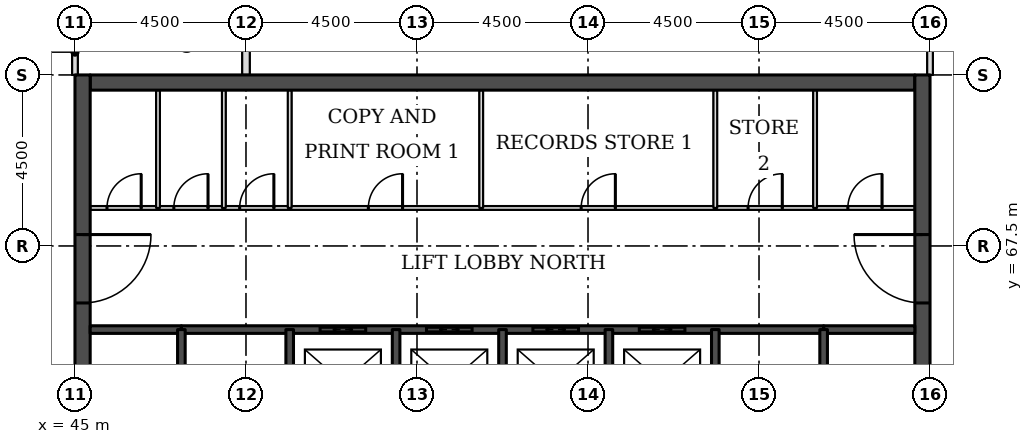
"""IFC4 building model, lengths in metres.
Left out: names, types, materials, properties, quantities, classifications, styles, units other than length and angle.
Written with IfcOpenShell. Run it as: python <this file> out.ifc"""

import sys

from ifc_helpers import new_model, si_unit, direction, frame, frame_2d, origin, place, context, subcontext, project, spatial, rectangle, extrude, element, fill, save


model = new_model("IFC4")
c1 = context("Model", 3, precision=1e-05, world=origin(), true_north=direction((0.0, 1.0)))
c2 = subcontext(c1, "Body", "Model", "MODEL_VIEW")
j1 = project(units=[si_unit("LENGTHUNIT", "METRE"), si_unit("PLANEANGLEUNIT", "RADIAN")], contexts=[c1])
p1 = place(None, origin())
s1 = spatial("IfcSite", under=j1, at=p1, CompositionType="ELEMENT")
p2 = place(p1, origin())
s2 = spatial("IfcBuilding", under=s1, at=p2, CompositionType="ELEMENT")
p3 = place(p2, frame((0.0, 0.0, 177.3)))
s3 = spatial("IfcBuildingStorey", under=s2, at=p3, CompositionType="ELEMENT", Elevation=177.3)
p4 = place(p3, frame((45.4, 71.8, 0.0), z_axis=(0.0, 0.0, 1.0), x_axis=(1.0, 0.0, 0.0)))
e1 = element("IfcWall", 1, at=p4, inside=s3, PredefinedType="SHEAR", context=c2, shape_type="SweptSolid", body=[
    extrude(rectangle(XDim=21.7, YDim=0.4, at=frame_2d((10.85, 0.0))), origin(), (0.0, 0.0, 1.0), 3.7),
])
p5 = place(p3, frame((45.2, 49.5, 0.0), z_axis=(0.0, 0.0, 1.0), x_axis=(0.0, 1.0, 0.0)))
e2 = element("IfcWall", 2, at=p5, inside=s3, PredefinedType="SHEAR", context=c2, shape_type="SweptSolid", body=[
    extrude(rectangle(XDim=22.5, YDim=0.4, at=frame_2d((11.25, 0.0))), origin(), (0.0, 0.0, 1.0), 3.7),
])
p6 = place(p5, frame((4.2, 0.0, 0.0)))
e3 = element("IfcOpeningElement", 3, at=p6, cuts=e2, PredefinedType="OPENING", context=c2, shape_type="SweptSolid", body=[
    extrude(rectangle(XDim=1.8, YDim=2.1, at=frame_2d((0.9, 1.05))), frame((0.0, 0.21, 0.0), z_axis=(0.0, -1.0, 0.0), x_axis=(1.0, 0.0, 0.0)), (0.0, 0.0, 1.0), 0.42),
])
p7 = place(p5, frame((6.9, 0.0, 0.0)))
e4 = element("IfcOpeningElement", 4, at=p7, cuts=e2, PredefinedType="OPENING", context=c2, shape_type="SweptSolid", body=[
    extrude(rectangle(XDim=1.1, YDim=2.1, at=frame_2d((0.55, 1.05))), frame((0.0, 0.21, 0.0), z_axis=(0.0, -1.0, 0.0), x_axis=(1.0, 0.0, 0.0)), (0.0, 0.0, 1.0), 0.42),
])
p8 = place(p5, frame((13.6, 0.0, 0.0)))
e5 = element("IfcOpeningElement", 5, at=p8, cuts=e2, PredefinedType="OPENING", context=c2, shape_type="SweptSolid", body=[
    extrude(rectangle(XDim=1.1, YDim=2.1, at=frame_2d((0.55, 1.05))), frame((0.0, 0.21, 0.0), z_axis=(0.0, -1.0, 0.0), x_axis=(1.0, 0.0, 0.0)), (0.0, 0.0, 1.0), 0.42),
])
p9 = place(p5, frame((16.5, 0.0, 0.0)))
e6 = element("IfcOpeningElement", 6, at=p9, cuts=e2, PredefinedType="OPENING", context=c2, shape_type="SweptSolid", body=[
    extrude(rectangle(XDim=1.8, YDim=2.1, at=frame_2d((0.9, 1.05))), frame((0.0, 0.21, 0.0), z_axis=(0.0, -1.0, 0.0), x_axis=(1.0, 0.0, 0.0)), (0.0, 0.0, 1.0), 0.42),
])
p10 = place(p3, frame((67.3, 49.5, 0.0), z_axis=(0.0, 0.0, 1.0), x_axis=(0.0, 1.0, 0.0)))
e7 = element("IfcWall", 7, at=p10, inside=s3, PredefinedType="SHEAR", context=c2, shape_type="SweptSolid", body=[
    extrude(rectangle(XDim=22.5, YDim=0.4, at=frame_2d((11.25, 0.0))), origin(), (0.0, 0.0, 1.0), 3.7),
])
p11 = place(p10, frame((4.2, 0.0, 0.0)))
e8 = element("IfcOpeningElement", 8, at=p11, cuts=e7, PredefinedType="OPENING", context=c2, shape_type="SweptSolid", body=[
    extrude(rectangle(XDim=1.8, YDim=2.1, at=frame_2d((0.9, 1.05))), frame((0.0, 0.21, 0.0), z_axis=(0.0, -1.0, 0.0), x_axis=(1.0, 0.0, 0.0)), (0.0, 0.0, 1.0), 0.42),
])
p12 = place(p10, frame((6.9, 0.0, 0.0)))
e9 = element("IfcOpeningElement", 9, at=p12, cuts=e7, PredefinedType="OPENING", context=c2, shape_type="SweptSolid", body=[
    extrude(rectangle(XDim=1.1, YDim=2.1, at=frame_2d((0.55, 1.05))), frame((0.0, 0.21, 0.0), z_axis=(0.0, -1.0, 0.0), x_axis=(1.0, 0.0, 0.0)), (0.0, 0.0, 1.0), 0.42),
])
p13 = place(p10, frame((13.6, 0.0, 0.0)))
e10 = element("IfcOpeningElement", 10, at=p13, cuts=e7, PredefinedType="OPENING", context=c2, shape_type="SweptSolid", body=[
    extrude(rectangle(XDim=1.1, YDim=2.1, at=frame_2d((0.55, 1.05))), frame((0.0, 0.21, 0.0), z_axis=(0.0, -1.0, 0.0), x_axis=(1.0, 0.0, 0.0)), (0.0, 0.0, 1.0), 0.42),
])
p14 = place(p10, frame((16.5, 0.0, 0.0)))
e11 = element("IfcOpeningElement", 11, at=p14, cuts=e7, PredefinedType="OPENING", context=c2, shape_type="SweptSolid", body=[
    extrude(rectangle(XDim=1.8, YDim=2.1, at=frame_2d((0.9, 1.05))), frame((0.0, 0.21, 0.0), z_axis=(0.0, -1.0, 0.0), x_axis=(1.0, 0.0, 0.0)), (0.0, 0.0, 1.0), 0.42),
])
p15 = place(p3, frame((45.0, 72.0, 0.0), z_axis=(0.0, 0.0, 1.0), x_axis=(0.0, 1.0, 0.0)))
e12 = element("IfcWall", 12, at=p15, inside=s3, PredefinedType="PARTITIONING", context=c2, shape_type="SweptSolid", body=[
    extrude(rectangle(XDim=6.0, YDim=0.15, at=frame_2d((3.0, 0.0))), origin(), (0.0, 0.0, 1.0), 3.022),
])
p16 = place(p15, frame((2.5, 0.0, 0.0)))
e13 = element("IfcOpeningElement", 13, at=p16, cuts=e12, PredefinedType="OPENING", context=c2, shape_type="SweptSolid", body=[
    extrude(rectangle(XDim=1.0, YDim=2.1, at=frame_2d((0.5, 1.05))), frame((0.0, 0.085, 0.0), z_axis=(0.0, -1.0, 0.0), x_axis=(1.0, 0.0, 0.0)), (0.0, 0.0, 1.0), 0.17),
])
p17 = place(p3, frame((49.5, 72.0, 0.0), z_axis=(0.0, 0.0, 1.0), x_axis=(0.0, 1.0, 0.0)))
e14 = element("IfcWall", 14, at=p17, inside=s3, PredefinedType="PARTITIONING", context=c2, shape_type="SweptSolid", body=[
    extrude(rectangle(XDim=3.0, YDim=0.2, at=frame_2d((1.5, 0.0))), origin(), (0.0, 0.0, 1.0), 3.55),
])
p18 = place(p3, frame((67.5, 72.0, 0.0), z_axis=(0.0, 0.0, 1.0), x_axis=(0.0, 1.0, 0.0)))
e15 = element("IfcWall", 15, at=p18, inside=s3, PredefinedType="PARTITIONING", context=c2, shape_type="SweptSolid", body=[
    extrude(rectangle(XDim=3.0, YDim=0.15, at=frame_2d((1.5, 0.0))), origin(), (0.0, 0.0, 1.0), 3.022),
])
p19 = place(p18, frame((1.0, 0.0, 0.0)))
e16 = element("IfcOpeningElement", 16, at=p19, cuts=e15, PredefinedType="OPENING", context=c2, shape_type="SweptSolid", body=[
    extrude(rectangle(XDim=1.0, YDim=2.1, at=frame_2d((0.5, 1.05))), frame((0.0, 0.085, 0.0), z_axis=(0.0, -1.0, 0.0), x_axis=(1.0, 0.0, 0.0)), (0.0, 0.0, 1.0), 0.17),
])
for number, where, z_axis, x_axis in (
    (17, (45.4, 65.3, 0.0), (0.0, 0.0, 1.0), (1.0, 0.0, 0.0)),
    (18, (64.7, 65.3, 0.0), (0.0, 0.0, 1.0), (1.0, 0.0, 0.0)),
):
    element("IfcWall", number, at=place(p3, frame(where, z_axis=z_axis, x_axis=x_axis)), inside=s3, PredefinedType="SOLIDWALL", context=c2, shape_type="SweptSolid", body=[
        extrude(rectangle(XDim=2.4, YDim=0.2, at=frame_2d((1.2, 0.0))), origin(), (0.0, 0.0, 1.0), 3.55),
    ])
p20 = place(p3, frame((47.8, 65.3, 0.0), z_axis=(0.0, 0.0, 1.0), x_axis=(1.0, 0.0, 0.0)))
e19 = element("IfcWall", 19, at=p20, inside=s3, PredefinedType="SOLIDWALL", context=c2, shape_type="SweptSolid", body=[
    extrude(rectangle(XDim=16.9, YDim=0.2, at=frame_2d((8.45, 0.0))), origin(), (0.0, 0.0, 1.0), 3.55),
])
p21 = place(p20, frame((3.65, 0.0, 0.0)))
e20 = element("IfcOpeningElement", 20, at=p21, cuts=e19, PredefinedType="OPENING", context=c2, shape_type="SweptSolid", body=[
    extrude(rectangle(XDim=1.2, YDim=2.1, at=frame_2d((0.6, 1.05))), frame((0.0, 0.11, 0.0), z_axis=(0.0, -1.0, 0.0), x_axis=(1.0, 0.0, 0.0)), (0.0, 0.0, 1.0), 0.22),
])
p22 = place(p20, frame((6.45, 0.0, 0.0)))
e21 = element("IfcOpeningElement", 21, at=p22, cuts=e19, PredefinedType="OPENING", context=c2, shape_type="SweptSolid", body=[
    extrude(rectangle(XDim=1.2, YDim=2.1, at=frame_2d((0.6, 1.05))), frame((0.0, 0.11, 0.0), z_axis=(0.0, -1.0, 0.0), x_axis=(1.0, 0.0, 0.0)), (0.0, 0.0, 1.0), 0.22),
])
p23 = place(p20, frame((9.25, 0.0, 0.0)))
e22 = element("IfcOpeningElement", 22, at=p23, cuts=e19, PredefinedType="OPENING", context=c2, shape_type="SweptSolid", body=[
    extrude(rectangle(XDim=1.2, YDim=2.1, at=frame_2d((0.6, 1.05))), frame((0.0, 0.11, 0.0), z_axis=(0.0, -1.0, 0.0), x_axis=(1.0, 0.0, 0.0)), (0.0, 0.0, 1.0), 0.22),
])
p24 = place(p20, frame((12.05, 0.0, 0.0)))
e23 = element("IfcOpeningElement", 23, at=p24, cuts=e19, PredefinedType="OPENING", context=c2, shape_type="SweptSolid", body=[
    extrude(rectangle(XDim=1.2, YDim=2.1, at=frame_2d((0.6, 1.05))), frame((0.0, 0.11, 0.0), z_axis=(0.0, -1.0, 0.0), x_axis=(1.0, 0.0, 0.0)), (0.0, 0.0, 1.0), 0.22),
])
p25 = place(p3, frame((45.4, 68.5, 0.0), z_axis=(0.0, 0.0, 1.0), x_axis=(1.0, 0.0, 0.0)))
e24 = element("IfcWall", 24, at=p25, inside=s3, PredefinedType="PARTITIONING", context=c2, shape_type="SweptSolid", body=[
    extrude(rectangle(XDim=21.7, YDim=0.1, at=frame_2d((10.85, 0.0))), origin(), (0.0, 0.0, 1.0), 3.55),
])
p26 = place(p25, frame((19.938, 0.0, 0.0)))
e25 = element("IfcOpeningElement", 25, at=p26, cuts=e24, PredefinedType="OPENING", context=c2, shape_type="SweptSolid", body=[
    extrude(rectangle(XDim=0.9, YDim=2.1, at=frame_2d((0.45, 1.05))), frame((0.0, 0.06, 0.0), z_axis=(0.0, -1.0, 0.0), x_axis=(1.0, 0.0, 0.0)), (0.0, 0.0, 1.0), 0.12),
])
p27 = place(p25, frame((17.312, 0.0, 0.0)))
e26 = element("IfcOpeningElement", 26, at=p27, cuts=e24, PredefinedType="OPENING", context=c2, shape_type="SweptSolid", body=[
    extrude(rectangle(XDim=0.9, YDim=2.1, at=frame_2d((0.45, 1.05))), frame((0.0, 0.06, 0.0), z_axis=(0.0, -1.0, 0.0), x_axis=(1.0, 0.0, 0.0)), (0.0, 0.0, 1.0), 0.12),
])
p28 = place(p25, frame((0.442, 0.0, 0.0)))
e27 = element("IfcOpeningElement", 27, at=p28, cuts=e24, PredefinedType="OPENING", context=c2, shape_type="SweptSolid", body=[
    extrude(rectangle(XDim=0.9, YDim=2.1, at=frame_2d((0.45, 1.05))), frame((0.0, 0.06, 0.0), z_axis=(0.0, -1.0, 0.0), x_axis=(1.0, 0.0, 0.0)), (0.0, 0.0, 1.0), 0.12),
])
p29 = place(p25, frame((2.201, 0.0, 0.0)))
e28 = element("IfcOpeningElement", 28, at=p29, cuts=e24, PredefinedType="OPENING", context=c2, shape_type="SweptSolid", body=[
    extrude(rectangle(XDim=0.9, YDim=2.1, at=frame_2d((0.45, 1.05))), frame((0.0, 0.06, 0.0), z_axis=(0.0, -1.0, 0.0), x_axis=(1.0, 0.0, 0.0)), (0.0, 0.0, 1.0), 0.12),
])
p30 = place(p25, frame((3.934, 0.0, 0.0)))
e29 = element("IfcOpeningElement", 29, at=p30, cuts=e24, PredefinedType="OPENING", context=c2, shape_type="SweptSolid", body=[
    extrude(rectangle(XDim=0.9, YDim=2.1, at=frame_2d((0.45, 1.05))), frame((0.0, 0.06, 0.0), z_axis=(0.0, -1.0, 0.0), x_axis=(1.0, 0.0, 0.0)), (0.0, 0.0, 1.0), 0.12),
])
p31 = place(p25, frame((12.92, 0.0, 0.0)))
e30 = element("IfcOpeningElement", 30, at=p31, cuts=e24, PredefinedType="OPENING", context=c2, shape_type="SweptSolid", body=[
    extrude(rectangle(XDim=0.9, YDim=2.1, at=frame_2d((0.45, 1.05))), frame((0.0, 0.06, 0.0), z_axis=(0.0, -1.0, 0.0), x_axis=(1.0, 0.0, 0.0)), (0.0, 0.0, 1.0), 0.12),
])
p32 = place(p25, frame((7.32, 0.0, 0.0)))
e31 = element("IfcOpeningElement", 31, at=p32, cuts=e24, PredefinedType="OPENING", context=c2, shape_type="SweptSolid", body=[
    extrude(rectangle(XDim=0.9, YDim=2.1, at=frame_2d((0.45, 1.05))), frame((0.0, 0.06, 0.0), z_axis=(0.0, -1.0, 0.0), x_axis=(1.0, 0.0, 0.0)), (0.0, 0.0, 1.0), 0.12),
])
p33 = place(p3, frame((47.185, 68.5, 0.0), z_axis=(0.0, 0.0, 1.0), x_axis=(0.0, 1.0, 0.0)))
e32 = element("IfcWall", 32, at=p33, inside=s3, PredefinedType="PARTITIONING", context=c2, shape_type="SweptSolid", body=[
    extrude(rectangle(XDim=3.1, YDim=0.1, at=frame_2d((1.55, 0.0))), origin(), (0.0, 0.0, 1.0), 3.55),
])
p34 = place(p3, frame((47.8, 62.0, 0.0), z_axis=(0.0, 0.0, 1.0), x_axis=(0.0, 1.0, 0.0)))
e33 = element("IfcWall", 33, at=p34, inside=s3, PredefinedType="SOLIDWALL", context=c2, shape_type="SweptSolid", body=[
    extrude(rectangle(XDim=3.3, YDim=0.2, at=frame_2d((1.65, 0.0))), origin(), (0.0, 0.0, 1.0), 3.55),
])
p35 = place(p34, frame((1.1, 0.0, 0.0)))
e34 = element("IfcOpeningElement", 34, at=p35, cuts=e33, PredefinedType="OPENING", context=c2, shape_type="SweptSolid", body=[
    extrude(rectangle(XDim=1.1, YDim=2.1, at=frame_2d((0.55, 1.05))), frame((0.0, 0.11, 0.0), z_axis=(0.0, -1.0, 0.0), x_axis=(1.0, 0.0, 0.0)), (0.0, 0.0, 1.0), 0.22),
])
for number, where, z_axis, x_axis in (
    (35, (48.917, 68.5, 0.0), (0.0, 0.0, 1.0), (0.0, 1.0, 0.0)),
    (36, (50.65, 68.5, 0.0), (0.0, 0.0, 1.0), (0.0, 1.0, 0.0)),
):
    element("IfcWall", number, at=place(p3, frame(where, z_axis=z_axis, x_axis=x_axis)), inside=s3, PredefinedType="PARTITIONING", context=c2, shape_type="SweptSolid", body=[
        extrude(rectangle(XDim=3.1, YDim=0.1, at=frame_2d((1.55, 0.0))), origin(), (0.0, 0.0, 1.0), 3.55),
    ])
p36 = place(p3, frame((50.65, 62.0, 0.0), z_axis=(0.0, 0.0, 1.0), x_axis=(0.0, 1.0, 0.0)))
e37 = element("IfcWall", 37, at=p36, inside=s3, PredefinedType="SOLIDWALL", context=c2, shape_type="SweptSolid", body=[
    extrude(rectangle(XDim=3.3, YDim=0.2, at=frame_2d((1.65, 0.0))), origin(), (0.0, 0.0, 1.0), 3.55),
])
p37 = place(p3, frame((53.45, 62.5, 0.0), z_axis=(0.0, 0.0, 1.0), x_axis=(0.0, 1.0, 0.0)))
e38 = element("IfcWall", 38, at=p37, inside=s3, PredefinedType="SOLIDWALL", context=c2, shape_type="SweptSolid", body=[
    extrude(rectangle(XDim=2.8, YDim=0.2, at=frame_2d((1.4, 0.0))), origin(), (0.0, 0.0, 1.0), 3.55),
])
p38 = place(p3, frame((55.69, 68.5, 0.0), z_axis=(0.0, 0.0, 1.0), x_axis=(0.0, 1.0, 0.0)))
e39 = element("IfcWall", 39, at=p38, inside=s3, PredefinedType="PARTITIONING", context=c2, shape_type="SweptSolid", body=[
    extrude(rectangle(XDim=3.1, YDim=0.1, at=frame_2d((1.55, 0.0))), origin(), (0.0, 0.0, 1.0), 3.55),
])
for number, where, z_axis, x_axis in (
    (40, (56.25, 62.5, 0.0), (0.0, 0.0, 1.0), (0.0, 1.0, 0.0)),
    (41, (59.05, 62.5, 0.0), (0.0, 0.0, 1.0), (0.0, 1.0, 0.0)),
):
    element("IfcWall", number, at=place(p3, frame(where, z_axis=z_axis, x_axis=x_axis)), inside=s3, PredefinedType="SOLIDWALL", context=c2, shape_type="SweptSolid", body=[
        extrude(rectangle(XDim=2.8, YDim=0.2, at=frame_2d((1.4, 0.0))), origin(), (0.0, 0.0, 1.0), 3.55),
    ])
p39 = place(p3, frame((61.85, 68.5, 0.0), z_axis=(0.0, 0.0, 1.0), x_axis=(0.0, 1.0, 0.0)))
e42 = element("IfcWall", 42, at=p39, inside=s3, PredefinedType="PARTITIONING", context=c2, shape_type="SweptSolid", body=[
    extrude(rectangle(XDim=3.1, YDim=0.1, at=frame_2d((1.55, 0.0))), origin(), (0.0, 0.0, 1.0), 3.55),
])
p40 = place(p3, frame((61.85, 62.0, 0.0), z_axis=(0.0, 0.0, 1.0), x_axis=(0.0, 1.0, 0.0)))
e43 = element("IfcWall", 43, at=p40, inside=s3, PredefinedType="SOLIDWALL", context=c2, shape_type="SweptSolid", body=[
    extrude(rectangle(XDim=3.3, YDim=0.2, at=frame_2d((1.65, 0.0))), origin(), (0.0, 0.0, 1.0), 3.55),
])
p41 = place(p3, frame((64.475, 68.5, 0.0), z_axis=(0.0, 0.0, 1.0), x_axis=(0.0, 1.0, 0.0)))
e44 = element("IfcWall", 44, at=p41, inside=s3, PredefinedType="PARTITIONING", context=c2, shape_type="SweptSolid", body=[
    extrude(rectangle(XDim=3.1, YDim=0.1, at=frame_2d((1.55, 0.0))), origin(), (0.0, 0.0, 1.0), 3.55),
])
p42 = place(p3, frame((64.7, 62.0, 0.0), z_axis=(0.0, 0.0, 1.0), x_axis=(0.0, 1.0, 0.0)))
e45 = element("IfcWall", 45, at=p42, inside=s3, PredefinedType="SOLIDWALL", context=c2, shape_type="SweptSolid", body=[
    extrude(rectangle(XDim=3.3, YDim=0.2, at=frame_2d((1.65, 0.0))), origin(), (0.0, 0.0, 1.0), 3.55),
])
p43 = place(p42, frame((1.1, 0.0, 0.0)))
e46 = element("IfcOpeningElement", 46, at=p43, cuts=e45, PredefinedType="OPENING", context=c2, shape_type="SweptSolid", body=[
    extrude(rectangle(XDim=1.1, YDim=2.1, at=frame_2d((0.55, 1.05))), frame((0.0, 0.11, 0.0), z_axis=(0.0, -1.0, 0.0), x_axis=(1.0, 0.0, 0.0)), (0.0, 0.0, 1.0), 0.22),
])
p44 = place(p21, origin())
e47 = element("IfcDoor", 47, at=p44, inside=s3, OperationType="DOUBLE_DOOR_SLIDING", PredefinedType="DOOR", context=c2, shape_type="SweptSolid", body=[
    extrude(rectangle(XDim=1.2, YDim=2.1, at=frame_2d((0.6, 1.05))), frame((0.0, 0.025, 0.0), z_axis=(0.0, -1.0, 0.0), x_axis=(1.0, 0.0, 0.0)), (0.0, 0.0, 1.0), 0.05),
])
fill(e20, e47)
p45 = place(p22, origin())
e48 = element("IfcDoor", 48, at=p45, inside=s3, OperationType="DOUBLE_DOOR_SLIDING", PredefinedType="DOOR", context=c2, shape_type="SweptSolid", body=[
    extrude(rectangle(XDim=1.2, YDim=2.1, at=frame_2d((0.6, 1.05))), frame((0.0, 0.025, 0.0), z_axis=(0.0, -1.0, 0.0), x_axis=(1.0, 0.0, 0.0)), (0.0, 0.0, 1.0), 0.05),
])
fill(e21, e48)
p46 = place(p23, origin())
e49 = element("IfcDoor", 49, at=p46, inside=s3, OperationType="DOUBLE_DOOR_SLIDING", PredefinedType="DOOR", context=c2, shape_type="SweptSolid", body=[
    extrude(rectangle(XDim=1.2, YDim=2.1, at=frame_2d((0.6, 1.05))), frame((0.0, 0.025, 0.0), z_axis=(0.0, -1.0, 0.0), x_axis=(1.0, 0.0, 0.0)), (0.0, 0.0, 1.0), 0.05),
])
fill(e22, e49)
p47 = place(p24, origin())
e50 = element("IfcDoor", 50, at=p47, inside=s3, OperationType="DOUBLE_DOOR_SLIDING", PredefinedType="DOOR", context=c2, shape_type="SweptSolid", body=[
    extrude(rectangle(XDim=1.2, YDim=2.1, at=frame_2d((0.6, 1.05))), frame((0.0, 0.025, 0.0), z_axis=(0.0, -1.0, 0.0), x_axis=(1.0, 0.0, 0.0)), (0.0, 0.0, 1.0), 0.05),
])
fill(e23, e50)
p48 = place(p9, frame((1.8, 0.0, 0.0), z_axis=(0.0, 0.0, 1.0), x_axis=(-1.0, 0.0, 0.0)))
e51 = element("IfcDoor", 51, at=p48, inside=s3, OperationType="SINGLE_SWING_LEFT", PredefinedType="DOOR", context=c2, shape_type="SweptSolid", body=[
    extrude(rectangle(XDim=1.8, YDim=2.1, at=frame_2d((0.9, 1.05))), frame((0.0, 0.025, 0.0), z_axis=(0.0, -1.0, 0.0), x_axis=(1.0, 0.0, 0.0)), (0.0, 0.0, 1.0), 0.05),
])
fill(e6, e51)
p49 = place(p14, origin())
e52 = element("IfcDoor", 52, at=p49, inside=s3, OperationType="SINGLE_SWING_RIGHT", PredefinedType="DOOR", context=c2, shape_type="SweptSolid", body=[
    extrude(rectangle(XDim=1.8, YDim=2.1, at=frame_2d((0.9, 1.05))), frame((0.0, 0.025, 0.0), z_axis=(0.0, -1.0, 0.0), x_axis=(1.0, 0.0, 0.0)), (0.0, 0.0, 1.0), 0.05),
])
fill(e11, e52)
p50 = place(p26, origin())
e53 = element("IfcDoor", 53, at=p50, inside=s3, OperationType="SINGLE_SWING_RIGHT", PredefinedType="DOOR", context=c2, shape_type="SweptSolid", body=[
    extrude(rectangle(XDim=0.9, YDim=2.1, at=frame_2d((0.45, 1.05))), frame((0.0, 0.025, 0.0), z_axis=(0.0, -1.0, 0.0), x_axis=(1.0, 0.0, 0.0)), (0.0, 0.0, 1.0), 0.05),
])
fill(e25, e53)
p51 = place(p27, origin())
e54 = element("IfcDoor", 54, at=p51, inside=s3, OperationType="SINGLE_SWING_RIGHT", PredefinedType="DOOR", context=c2, shape_type="SweptSolid", body=[
    extrude(rectangle(XDim=0.9, YDim=2.1, at=frame_2d((0.45, 1.05))), frame((0.0, 0.025, 0.0), z_axis=(0.0, -1.0, 0.0), x_axis=(1.0, 0.0, 0.0)), (0.0, 0.0, 1.0), 0.05),
])
fill(e26, e54)
p52 = place(p28, origin())
e55 = element("IfcDoor", 55, at=p52, inside=s3, OperationType="SINGLE_SWING_RIGHT", PredefinedType="DOOR", context=c2, shape_type="SweptSolid", body=[
    extrude(rectangle(XDim=0.9, YDim=2.1, at=frame_2d((0.45, 1.05))), frame((0.0, 0.025, 0.0), z_axis=(0.0, -1.0, 0.0), x_axis=(1.0, 0.0, 0.0)), (0.0, 0.0, 1.0), 0.05),
])
fill(e27, e55)
p53 = place(p29, origin())
e56 = element("IfcDoor", 56, at=p53, inside=s3, OperationType="SINGLE_SWING_RIGHT", PredefinedType="DOOR", context=c2, shape_type="SweptSolid", body=[
    extrude(rectangle(XDim=0.9, YDim=2.1, at=frame_2d((0.45, 1.05))), frame((0.0, 0.025, 0.0), z_axis=(0.0, -1.0, 0.0), x_axis=(1.0, 0.0, 0.0)), (0.0, 0.0, 1.0), 0.05),
])
fill(e28, e56)
p54 = place(p30, origin())
e57 = element("IfcDoor", 57, at=p54, inside=s3, OperationType="SINGLE_SWING_RIGHT", PredefinedType="DOOR", context=c2, shape_type="SweptSolid", body=[
    extrude(rectangle(XDim=0.9, YDim=2.1, at=frame_2d((0.45, 1.05))), frame((0.0, 0.025, 0.0), z_axis=(0.0, -1.0, 0.0), x_axis=(1.0, 0.0, 0.0)), (0.0, 0.0, 1.0), 0.05),
])
fill(e29, e57)
p55 = place(p31, origin())
e58 = element("IfcDoor", 58, at=p55, inside=s3, OperationType="SINGLE_SWING_RIGHT", PredefinedType="DOOR", context=c2, shape_type="SweptSolid", body=[
    extrude(rectangle(XDim=0.9, YDim=2.1, at=frame_2d((0.45, 1.05))), frame((0.0, 0.025, 0.0), z_axis=(0.0, -1.0, 0.0), x_axis=(1.0, 0.0, 0.0)), (0.0, 0.0, 1.0), 0.05),
])
fill(e30, e58)
p56 = place(p32, origin())
e59 = element("IfcDoor", 59, at=p56, inside=s3, OperationType="SINGLE_SWING_RIGHT", PredefinedType="DOOR", context=c2, shape_type="SweptSolid", body=[
    extrude(rectangle(XDim=0.9, YDim=2.1, at=frame_2d((0.45, 1.05))), frame((0.0, 0.025, 0.0), z_axis=(0.0, -1.0, 0.0), x_axis=(1.0, 0.0, 0.0)), (0.0, 0.0, 1.0), 0.05),
])
fill(e31, e59)
save(model, sys.argv[1])
